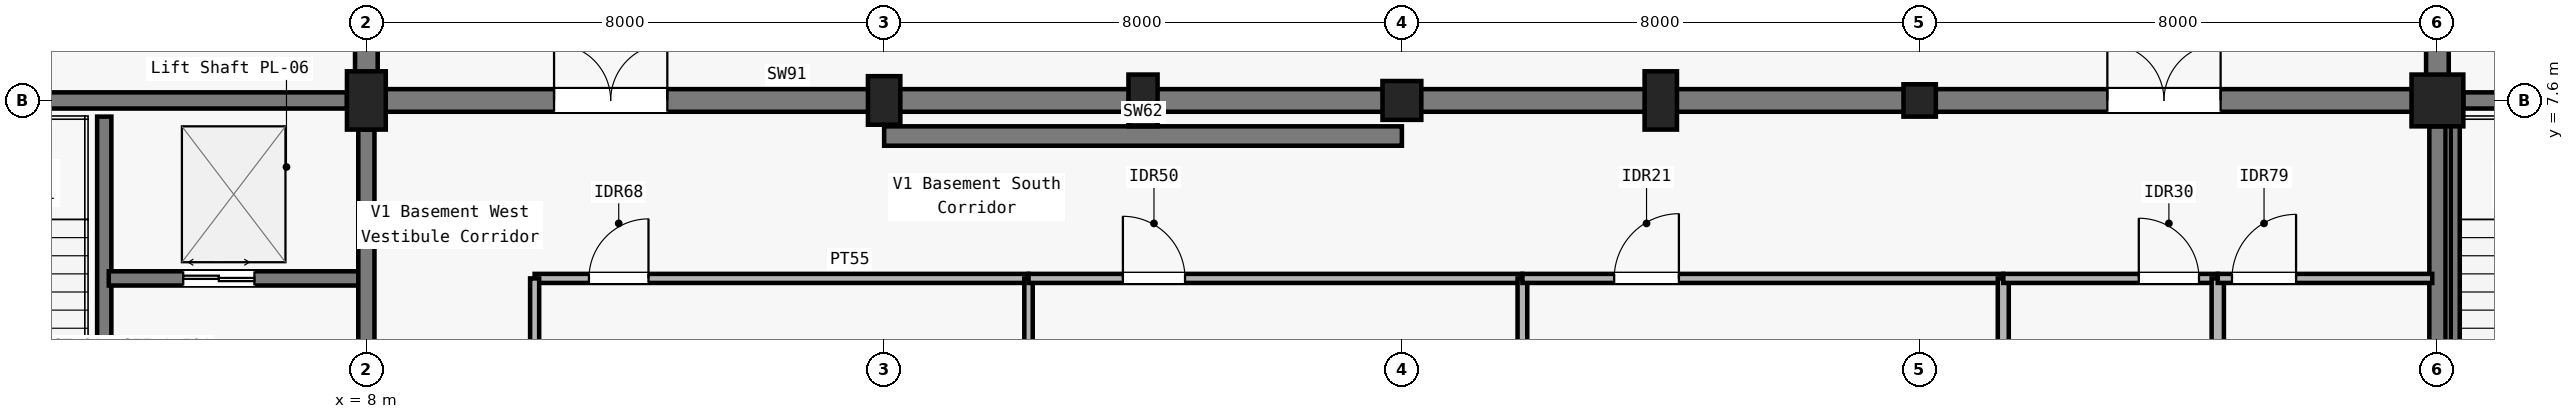
"""IFC4 building model, lengths in metres.
Left out: names, types, materials, properties, quantities, classifications, styles, units other than length and angle.
Written with IfcOpenShell. Run it as: python <this file> out.ifc"""

import sys

from ifc_helpers import new_model, si_unit, direction, frame, frame_2d, origin, origin_2d, place, context, subcontext, project, spatial, rectangle, circle, extrude, element, fill, save


model = new_model("IFC4")
c1 = context("Model", 3, precision=1e-05, world=origin(), true_north=direction((0.0, 1.0)))
c2 = subcontext(c1, "Body", "Model", "MODEL_VIEW")
j1 = project(units=[si_unit("LENGTHUNIT", "METRE"), si_unit("PLANEANGLEUNIT", "RADIAN")], contexts=[c1])
p1 = place(None, origin())
s1 = spatial("IfcSite", under=j1, at=p1, CompositionType="ELEMENT")
p2 = place(p1, origin())
s2 = spatial("IfcBuilding", under=s1, at=p2, CompositionType="ELEMENT")
p3 = place(p2, frame((0.0, 0.0, -5.4)))
s3 = spatial("IfcBuildingStorey", under=s2, at=p3, CompositionType="ELEMENT", Elevation=-5.4)
p4 = place(p3, frame((8.0, 7.6, 0.0), z_axis=(0.0, 0.0, 1.0), x_axis=(1.0, 0.0, 0.0)))
e1 = element("IfcColumn", 1, at=p4, inside=s3, PredefinedType="COLUMN", context=c2, shape_type="SweptSolid", body=[
    extrude(rectangle(XDim=0.6, YDim=0.9, at=origin_2d()), origin(), (0.0, 0.0, 1.0), 5.4),
])
p5 = place(p3, frame((16.0, 7.6, 0.0), z_axis=(0.0, 0.0, 1.0), x_axis=(1.0, 0.0, 0.0)))
e2 = element("IfcColumn", 2, at=p5, inside=s3, PredefinedType="COLUMN", context=c2, shape_type="SweptSolid", body=[
    extrude(rectangle(XDim=0.5, YDim=0.75, at=origin_2d()), origin(), (0.0, 0.0, 1.0), 5.4),
])
p6 = place(p3, frame((24.0, 7.6, 0.0), z_axis=(0.0, 0.0, 1.0), x_axis=(1.0, 0.0, 0.0)))
e3 = element("IfcColumn", 3, at=p6, inside=s3, PredefinedType="COLUMN", context=c2, shape_type="SweptSolid", body=[
    extrude(rectangle(XDim=0.6, YDim=0.6, at=origin_2d()), origin(), (0.0, 0.0, 1.0), 5.4),
])
p7 = place(p3, frame((32.0, 7.6, 0.0), z_axis=(0.0, 0.0, 1.0), x_axis=(1.0, 0.0, 0.0)))
e4 = element("IfcColumn", 4, at=p7, inside=s3, PredefinedType="COLUMN", context=c2, shape_type="SweptSolid", body=[
    extrude(rectangle(XDim=0.5, YDim=0.5, at=origin_2d()), origin(), (0.0, 0.0, 1.0), 5.4),
])
p8 = place(p3, frame((40.0, 7.6, 0.0), z_axis=(0.0, 0.0, 1.0), x_axis=(1.0, 0.0, 0.0)))
e5 = element("IfcColumn", 5, at=p8, inside=s3, PredefinedType="COLUMN", context=c2, shape_type="SweptSolid", body=[
    extrude(circle(Radius=0.4, at=origin_2d()), origin(), (0.0, 0.0, 1.0), 5.4),
])
p9 = place(p3, frame((20.0, 7.6, 0.0), z_axis=(0.0, 0.0, 1.0), x_axis=(1.0, 0.0, 0.0)))
e6 = element("IfcColumn", 6, at=p9, inside=s3, PredefinedType="PILASTER", context=c2, shape_type="SweptSolid", body=[
    extrude(rectangle(XDim=0.45, YDim=0.8, at=origin_2d()), origin(), (0.0, 0.0, 1.0), 5.4),
])
p10 = place(p3, frame((28.0, 7.6, 0.0), z_axis=(0.0, 0.0, 1.0), x_axis=(1.0, 0.0, 0.0)))
e7 = element("IfcColumn", 7, at=p10, inside=s3, PredefinedType="PILASTER", context=c2, shape_type="SweptSolid", body=[
    extrude(rectangle(XDim=0.5, YDim=0.9, at=origin_2d()), origin(), (0.0, 0.0, 1.0), 5.4),
])
p11 = place(p3, frame((8.0, 7.6, 0.0), z_axis=(0.0, 0.0, 1.0), x_axis=(1.0, 0.0, 0.0)))
e8 = element("IfcWall", 8, at=p11, inside=s3, PredefinedType="SHEAR", context=c2, shape_type="SweptSolid", body=[
    extrude(rectangle(XDim=8.0, YDim=0.35, at=frame_2d((4.0, 0.0))), origin(), (0.0, 0.0, 1.0), 5.08),
])
p12 = place(p11, frame((2.9, 0.0, 0.0)))
e9 = element("IfcOpeningElement", 9, at=p12, cuts=e8, PredefinedType="OPENING", context=c2, shape_type="SweptSolid", body=[
    extrude(rectangle(XDim=1.75, YDim=2.25, at=frame_2d((0.875, 1.125))), frame((0.0, 0.185, 0.0), z_axis=(0.0, -1.0, 0.0), x_axis=(1.0, 0.0, 0.0)), (0.0, 0.0, 1.0), 0.37),
])
for number, where, z_axis, x_axis in (
    (10, (16.0, 7.6, 0.0), (0.0, 0.0, 1.0), (1.0, 0.0, 0.0)),
    (11, (24.0, 7.6, 0.0), (0.0, 0.0, 1.0), (1.0, 0.0, 0.0)),
):
    element("IfcWall", number, at=place(p3, frame(where, z_axis=z_axis, x_axis=x_axis)), inside=s3, PredefinedType="SHEAR", context=c2, shape_type="SweptSolid", body=[
        extrude(rectangle(XDim=8.0, YDim=0.35, at=frame_2d((4.0, 0.0))), origin(), (0.0, 0.0, 1.0), 5.08),
    ])
p13 = place(p3, frame((32.0, 7.6, 0.0), z_axis=(0.0, 0.0, 1.0), x_axis=(1.0, 0.0, 0.0)))
e12 = element("IfcWall", 12, at=p13, inside=s3, PredefinedType="SHEAR", context=c2, shape_type="SweptSolid", body=[
    extrude(rectangle(XDim=8.0, YDim=0.35, at=frame_2d((4.0, 0.0))), origin(), (0.0, 0.0, 1.0), 5.08),
])
p14 = place(p13, frame((2.9, 0.0, 0.0)))
e13 = element("IfcOpeningElement", 13, at=p14, cuts=e12, PredefinedType="OPENING", context=c2, shape_type="SweptSolid", body=[
    extrude(rectangle(XDim=1.75, YDim=2.25, at=frame_2d((0.875, 1.125))), frame((0.0, 0.185, 0.0), z_axis=(0.0, -1.0, 0.0), x_axis=(1.0, 0.0, 0.0)), (0.0, 0.0, 1.0), 0.37),
])
for number, where, z_axis, x_axis in (
    (14, (8.0, 7.6, 0.0), (0.0, 0.0, 1.0), (0.0, 1.0, 0.0)),
    (15, (40.0, 7.6, 0.0), (0.0, 0.0, 1.0), (0.0, 1.0, 0.0)),
):
    element("IfcWall", number, at=place(p3, frame(where, z_axis=z_axis, x_axis=x_axis)), inside=s3, PredefinedType="SHEAR", context=c2, shape_type="SweptSolid", body=[
        extrude(rectangle(XDim=7.6, YDim=0.35, at=frame_2d((3.8, 0.0))), origin(), (0.0, 0.0, 1.0), 5.08),
    ])
p15 = place(p3, frame((16.0, 7.05, 0.0), z_axis=(0.0, 0.0, 1.0), x_axis=(1.0, 0.0, 0.0)))
e16 = element("IfcWall", 16, at=p15, inside=s3, PredefinedType="SHEAR", context=c2, shape_type="SweptSolid", body=[
    extrude(rectangle(XDim=8.0, YDim=0.3, at=frame_2d((4.0, 0.0))), origin(), (0.0, 0.0, 1.0), 5.08),
])
p16 = place(p3, frame((0.35, 7.6, 0.0), z_axis=(0.0, 0.0, 1.0), x_axis=(1.0, 0.0, 0.0)))
e17 = element("IfcWall", 17, at=p16, inside=s3, PredefinedType="SOLIDWALL", context=c2, shape_type="SweptSolid", body=[
    extrude(rectangle(XDim=7.35, YDim=0.25, at=frame_2d((3.675, 0.0))), origin(), (0.0, 0.0, 1.0), 4.33),
])
p17 = place(p3, frame((3.95, 0.25, 0.0), z_axis=(0.0, 0.0, 1.0), x_axis=(0.0, 1.0, 0.0)))
e18 = element("IfcWall", 18, at=p17, inside=s3, PredefinedType="SOLIDWALL", context=c2, shape_type="SweptSolid", body=[
    extrude(rectangle(XDim=7.1, YDim=0.22, at=frame_2d((3.55, 0.0))), origin(), (0.0, 0.0, 1.0), 5.08),
])
p18 = place(p17, frame((0.35, 0.0, 0.0)))
e19 = element("IfcOpeningElement", 19, at=p18, cuts=e18, PredefinedType="OPENING", context=c2, shape_type="SweptSolid", body=[
    extrude(rectangle(XDim=1.2, YDim=2.15, at=frame_2d((0.6, 1.075))), frame((0.0, 0.12, 0.0), z_axis=(0.0, -1.0, 0.0), x_axis=(1.0, 0.0, 0.0)), (0.0, 0.0, 1.0), 0.24),
])
p19 = place(p3, frame((4.02, 4.85, 0.0), z_axis=(0.0, 0.0, 1.0), x_axis=(1.0, 0.0, 0.0)))
e20 = element("IfcWall", 20, at=p19, inside=s3, PredefinedType="SOLIDWALL", context=c2, shape_type="SweptSolid", body=[
    extrude(rectangle(XDim=3.93, YDim=0.22, at=frame_2d((1.965, 0.0))), origin(), (0.0, 0.0, 1.0), 4.455),
])
p20 = place(p19, frame((1.15, 0.0, 0.0)))
e21 = element("IfcOpeningElement", 21, at=p20, cuts=e20, PredefinedType="OPENING", context=c2, shape_type="SweptSolid", body=[
    extrude(rectangle(XDim=1.1, YDim=2.2, at=frame_2d((0.55, 1.1))), frame((0.0, 0.12, 0.0), z_axis=(0.0, -1.0, 0.0), x_axis=(1.0, 0.0, 0.0)), (0.0, 0.0, 1.0), 0.24),
])
p21 = place(p3, frame((8.0, 0.35, 0.0), z_axis=(0.0, 0.0, 1.0), x_axis=(0.0, 1.0, 0.0)))
e22 = element("IfcWall", 22, at=p21, inside=s3, PredefinedType="SOLIDWALL", context=c2, shape_type="SweptSolid", body=[
    extrude(rectangle(XDim=6.8, YDim=0.25, at=frame_2d((3.4, 0.0))), origin(), (0.0, 0.0, 1.0), 4.45),
])
p22 = place(p21, frame((2.0, 0.0, 0.0)))
e23 = element("IfcOpeningElement", 23, at=p22, cuts=e22, PredefinedType="OPENING", context=c2, shape_type="SweptSolid", body=[
    extrude(rectangle(XDim=1.35, YDim=2.2, at=frame_2d((0.675, 1.1))), frame((0.0, 0.135, 0.0), z_axis=(0.0, -1.0, 0.0), x_axis=(1.0, 0.0, 0.0)), (0.0, 0.0, 1.0), 0.27),
])
p23 = place(p3, frame((40.0, 0.25, 0.0), z_axis=(0.0, 0.0, 1.0), x_axis=(0.0, 1.0, 0.0)))
e24 = element("IfcWall", 24, at=p23, inside=s3, PredefinedType="SOLIDWALL", context=c2, shape_type="SweptSolid", body=[
    extrude(rectangle(XDim=6.95, YDim=0.25, at=frame_2d((3.475, 0.0))), origin(), (0.0, 0.0, 1.0), 4.255),
])
p24 = place(p3, frame((40.4, 7.6, 0.0), z_axis=(0.0, 0.0, 1.0), x_axis=(1.0, 0.0, 0.0)))
e25 = element("IfcWall", 25, at=p24, inside=s3, PredefinedType="SOLIDWALL", context=c2, shape_type="SweptSolid", body=[
    extrude(rectangle(XDim=7.52, YDim=0.25, at=frame_2d((3.76, 0.0))), origin(), (0.0, 0.0, 1.0), 4.255),
])
p25 = place(p3, frame((10.6, 4.85, 0.0), z_axis=(0.0, 0.0, 1.0), x_axis=(1.0, 0.0, 0.0)))
e26 = element("IfcWall", 26, at=p25, inside=s3, PredefinedType="PARTITIONING", context=c2, shape_type="SweptSolid", body=[
    extrude(rectangle(XDim=7.631, YDim=0.14, at=frame_2d((3.815, 0.0))), origin(), (0.0, 0.0, 1.0), 4.435),
])
p26 = place(p25, frame((0.839, 0.0, 0.0)))
e27 = element("IfcOpeningElement", 27, at=p26, cuts=e26, PredefinedType="OPENING", context=c2, shape_type="SweptSolid", body=[
    extrude(rectangle(XDim=0.92, YDim=2.05, at=frame_2d((0.46, 1.025))), frame((0.0, 0.08, 0.0), z_axis=(0.0, -1.0, 0.0), x_axis=(1.0, 0.0, 0.0)), (0.0, 0.0, 1.0), 0.16),
])
p27 = place(p3, frame((18.231, 0.08, 0.0), z_axis=(0.0, 0.0, 1.0), x_axis=(0.0, 1.0, 0.0)))
e28 = element("IfcWall", 28, at=p27, inside=s3, PredefinedType="PARTITIONING", context=c2, shape_type="SweptSolid", body=[
    extrude(rectangle(XDim=4.77, YDim=0.13, at=frame_2d((2.385, 0.0))), origin(), (0.0, 0.0, 1.0), 4.33),
])
p28 = place(p3, frame((18.231, 4.85, 0.0), z_axis=(0.0, 0.0, 1.0), x_axis=(1.0, 0.0, 0.0)))
e29 = element("IfcWall", 29, at=p28, inside=s3, PredefinedType="PARTITIONING", context=c2, shape_type="SweptSolid", body=[
    extrude(rectangle(XDim=7.631, YDim=0.14, at=frame_2d((3.815, 0.0))), origin(), (0.0, 0.0, 1.0), 4.41),
])
p29 = place(p28, frame((1.458, 0.0, 0.0)))
e30 = element("IfcOpeningElement", 30, at=p29, cuts=e29, PredefinedType="OPENING", context=c2, shape_type="SweptSolid", body=[
    extrude(rectangle(XDim=0.96, YDim=2.05, at=frame_2d((0.48, 1.025))), frame((0.0, 0.08, 0.0), z_axis=(0.0, -1.0, 0.0), x_axis=(1.0, 0.0, 0.0)), (0.0, 0.0, 1.0), 0.16),
])
p30 = place(p3, frame((25.862, 0.08, 0.0), z_axis=(0.0, 0.0, 1.0), x_axis=(0.0, 1.0, 0.0)))
e31 = element("IfcWall", 31, at=p30, inside=s3, PredefinedType="PARTITIONING", context=c2, shape_type="SweptSolid", body=[
    extrude(rectangle(XDim=4.77, YDim=0.15, at=frame_2d((2.385, 0.0))), origin(), (0.0, 0.0, 1.0), 4.305),
])
p31 = place(p3, frame((25.862, 4.85, 0.0), z_axis=(0.0, 0.0, 1.0), x_axis=(1.0, 0.0, 0.0)))
e32 = element("IfcWall", 32, at=p31, inside=s3, PredefinedType="PARTITIONING", context=c2, shape_type="SweptSolid", body=[
    extrude(rectangle(XDim=7.43, YDim=0.14, at=frame_2d((3.715, 0.0))), origin(), (0.0, 0.0, 1.0), 4.305),
])
p32 = place(p31, frame((1.418, 0.0, 0.0)))
e33 = element("IfcOpeningElement", 33, at=p32, cuts=e32, PredefinedType="OPENING", context=c2, shape_type="SweptSolid", body=[
    extrude(rectangle(XDim=1.0, YDim=2.05, at=frame_2d((0.5, 1.025))), frame((0.0, 0.08, 0.0), z_axis=(0.0, -1.0, 0.0), x_axis=(1.0, 0.0, 0.0)), (0.0, 0.0, 1.0), 0.16),
])
p33 = place(p3, frame((33.292, 0.08, 0.0), z_axis=(0.0, 0.0, 1.0), x_axis=(0.0, 1.0, 0.0)))
e34 = element("IfcWall", 34, at=p33, inside=s3, PredefinedType="PARTITIONING", context=c2, shape_type="SweptSolid", body=[
    extrude(rectangle(XDim=4.77, YDim=0.17, at=frame_2d((2.385, 0.0))), origin(), (0.0, 0.0, 1.0), 4.475),
])
p34 = place(p3, frame((33.292, 4.85, 0.0), z_axis=(0.0, 0.0, 1.0), x_axis=(1.0, 0.0, 0.0)))
e35 = element("IfcWall", 35, at=p34, inside=s3, PredefinedType="PARTITIONING", context=c2, shape_type="SweptSolid", body=[
    extrude(rectangle(XDim=3.314, YDim=0.14, at=frame_2d((1.657, 0.0))), origin(), (0.0, 0.0, 1.0), 4.495),
])
p35 = place(p34, frame((2.094, 0.0, 0.0)))
e36 = element("IfcOpeningElement", 36, at=p35, cuts=e35, PredefinedType="OPENING", context=c2, shape_type="SweptSolid", body=[
    extrude(rectangle(XDim=0.93, YDim=2.1, at=frame_2d((0.465, 1.05))), frame((0.0, 0.08, 0.0), z_axis=(0.0, -1.0, 0.0), x_axis=(1.0, 0.0, 0.0)), (0.0, 0.0, 1.0), 0.16),
])
p36 = place(p3, frame((36.606, 0.08, 0.0), z_axis=(0.0, 0.0, 1.0), x_axis=(0.0, 1.0, 0.0)))
e37 = element("IfcWall", 37, at=p36, inside=s3, PredefinedType="PARTITIONING", context=c2, shape_type="SweptSolid", body=[
    extrude(rectangle(XDim=4.77, YDim=0.19, at=frame_2d((2.385, 0.0))), origin(), (0.0, 0.0, 1.0), 4.475),
])
p37 = place(p3, frame((36.606, 4.85, 0.0), z_axis=(0.0, 0.0, 1.0), x_axis=(1.0, 0.0, 0.0)))
e38 = element("IfcWall", 38, at=p37, inside=s3, PredefinedType="PARTITIONING", context=c2, shape_type="SweptSolid", body=[
    extrude(rectangle(XDim=3.314, YDim=0.14, at=frame_2d((1.657, 0.0))), origin(), (0.0, 0.0, 1.0), 4.255),
])
p38 = place(p37, frame((0.22, 0.0, 0.0)))
e39 = element("IfcOpeningElement", 39, at=p38, cuts=e38, PredefinedType="OPENING", context=c2, shape_type="SweptSolid", body=[
    extrude(rectangle(XDim=0.99, YDim=2.1, at=frame_2d((0.495, 1.05))), frame((0.0, 0.08, 0.0), z_axis=(0.0, -1.0, 0.0), x_axis=(1.0, 0.0, 0.0)), (0.0, 0.0, 1.0), 0.16),
])
p39 = place(p3, frame((10.6, 0.08, 0.0), z_axis=(0.0, 0.0, 1.0), x_axis=(0.0, 1.0, 0.0)))
e40 = element("IfcWall", 40, at=p39, inside=s3, PredefinedType="PARTITIONING", context=c2, shape_type="SweptSolid", body=[
    extrude(rectangle(XDim=4.77, YDim=0.14, at=frame_2d((2.385, 0.0))), origin(), (0.0, 0.0, 1.0), 4.45),
])
p40 = place(p3, frame((40.275, 0.15, 0.0), z_axis=(0.0, 0.0, 1.0), x_axis=(0.0, 1.0, 0.0)))
e41 = element("IfcWall", 41, at=p40, inside=s3, PredefinedType="SOLIDWALL", context=c2, shape_type="SweptSolid", body=[
    extrude(rectangle(XDim=7.3, YDim=0.14, at=frame_2d((3.65, 0.0))), origin(), (0.0, 0.0, 1.0), 5.08),
])
p41 = place(p20, origin())
e42 = element("IfcDoor", 42, at=p41, inside=s3, OperationType="DOUBLE_DOOR_SLIDING", PredefinedType="DOOR", context=c2, shape_type="SweptSolid", body=[
    extrude(rectangle(XDim=1.1, YDim=2.2, at=frame_2d((0.55, 1.1))), frame((0.0, 0.025, 0.0), z_axis=(0.0, -1.0, 0.0), x_axis=(1.0, 0.0, 0.0)), (0.0, 0.0, 1.0), 0.05),
])
fill(e21, e42)
p42 = place(p26, origin())
e43 = element("IfcDoor", 43, at=p42, inside=s3, OperationType="SINGLE_SWING_RIGHT", PredefinedType="DOOR", context=c2, shape_type="SweptSolid", body=[
    extrude(rectangle(XDim=0.92, YDim=2.05, at=frame_2d((0.46, 1.025))), frame((0.0, 0.025, 0.0), z_axis=(0.0, -1.0, 0.0), x_axis=(1.0, 0.0, 0.0)), (0.0, 0.0, 1.0), 0.05),
])
fill(e27, e43)
p43 = place(p29, origin())
e44 = element("IfcDoor", 44, at=p43, inside=s3, OperationType="SINGLE_SWING_LEFT", PredefinedType="DOOR", context=c2, shape_type="SweptSolid", body=[
    extrude(rectangle(XDim=0.96, YDim=2.05, at=frame_2d((0.48, 1.025))), frame((0.0, 0.025, 0.0), z_axis=(0.0, -1.0, 0.0), x_axis=(1.0, 0.0, 0.0)), (0.0, 0.0, 1.0), 0.05),
])
fill(e30, e44)
p44 = place(p32, origin())
e45 = element("IfcDoor", 45, at=p44, inside=s3, OperationType="SINGLE_SWING_RIGHT", PredefinedType="DOOR", context=c2, shape_type="SweptSolid", body=[
    extrude(rectangle(XDim=1.0, YDim=2.05, at=frame_2d((0.5, 1.025))), frame((0.0, 0.025, 0.0), z_axis=(0.0, -1.0, 0.0), x_axis=(1.0, 0.0, 0.0)), (0.0, 0.0, 1.0), 0.05),
])
fill(e33, e45)
p45 = place(p35, origin())
e46 = element("IfcDoor", 46, at=p45, inside=s3, OperationType="SINGLE_SWING_LEFT", PredefinedType="DOOR", context=c2, shape_type="SweptSolid", body=[
    extrude(rectangle(XDim=0.93, YDim=2.1, at=frame_2d((0.465, 1.05))), frame((0.0, 0.025, 0.0), z_axis=(0.0, -1.0, 0.0), x_axis=(1.0, 0.0, 0.0)), (0.0, 0.0, 1.0), 0.05),
])
fill(e36, e46)
p46 = place(p38, origin())
e47 = element("IfcDoor", 47, at=p46, inside=s3, OperationType="SINGLE_SWING_RIGHT", PredefinedType="DOOR", context=c2, shape_type="SweptSolid", body=[
    extrude(rectangle(XDim=0.99, YDim=2.1, at=frame_2d((0.495, 1.05))), frame((0.0, 0.025, 0.0), z_axis=(0.0, -1.0, 0.0), x_axis=(1.0, 0.0, 0.0)), (0.0, 0.0, 1.0), 0.05),
])
fill(e39, e47)
p47 = place(p12, origin())
e48 = element("IfcDoor", 48, at=p47, inside=s3, OperationType="DOUBLE_DOOR_SINGLE_SWING", PredefinedType="DOOR", context=c2, shape_type="SweptSolid", body=[
    extrude(rectangle(XDim=1.75, YDim=2.25, at=frame_2d((0.875, 1.125))), frame((0.0, 0.025, 0.0), z_axis=(0.0, -1.0, 0.0), x_axis=(1.0, 0.0, 0.0)), (0.0, 0.0, 1.0), 0.05),
])
fill(e9, e48)
p48 = place(p14, origin())
e49 = element("IfcDoor", 49, at=p48, inside=s3, OperationType="DOUBLE_DOOR_SINGLE_SWING", PredefinedType="DOOR", context=c2, shape_type="SweptSolid", body=[
    extrude(rectangle(XDim=1.75, YDim=2.25, at=frame_2d((0.875, 1.125))), frame((0.0, 0.025, 0.0), z_axis=(0.0, -1.0, 0.0), x_axis=(1.0, 0.0, 0.0)), (0.0, 0.0, 1.0), 0.05),
])
fill(e13, e49)
save(model, sys.argv[1])
